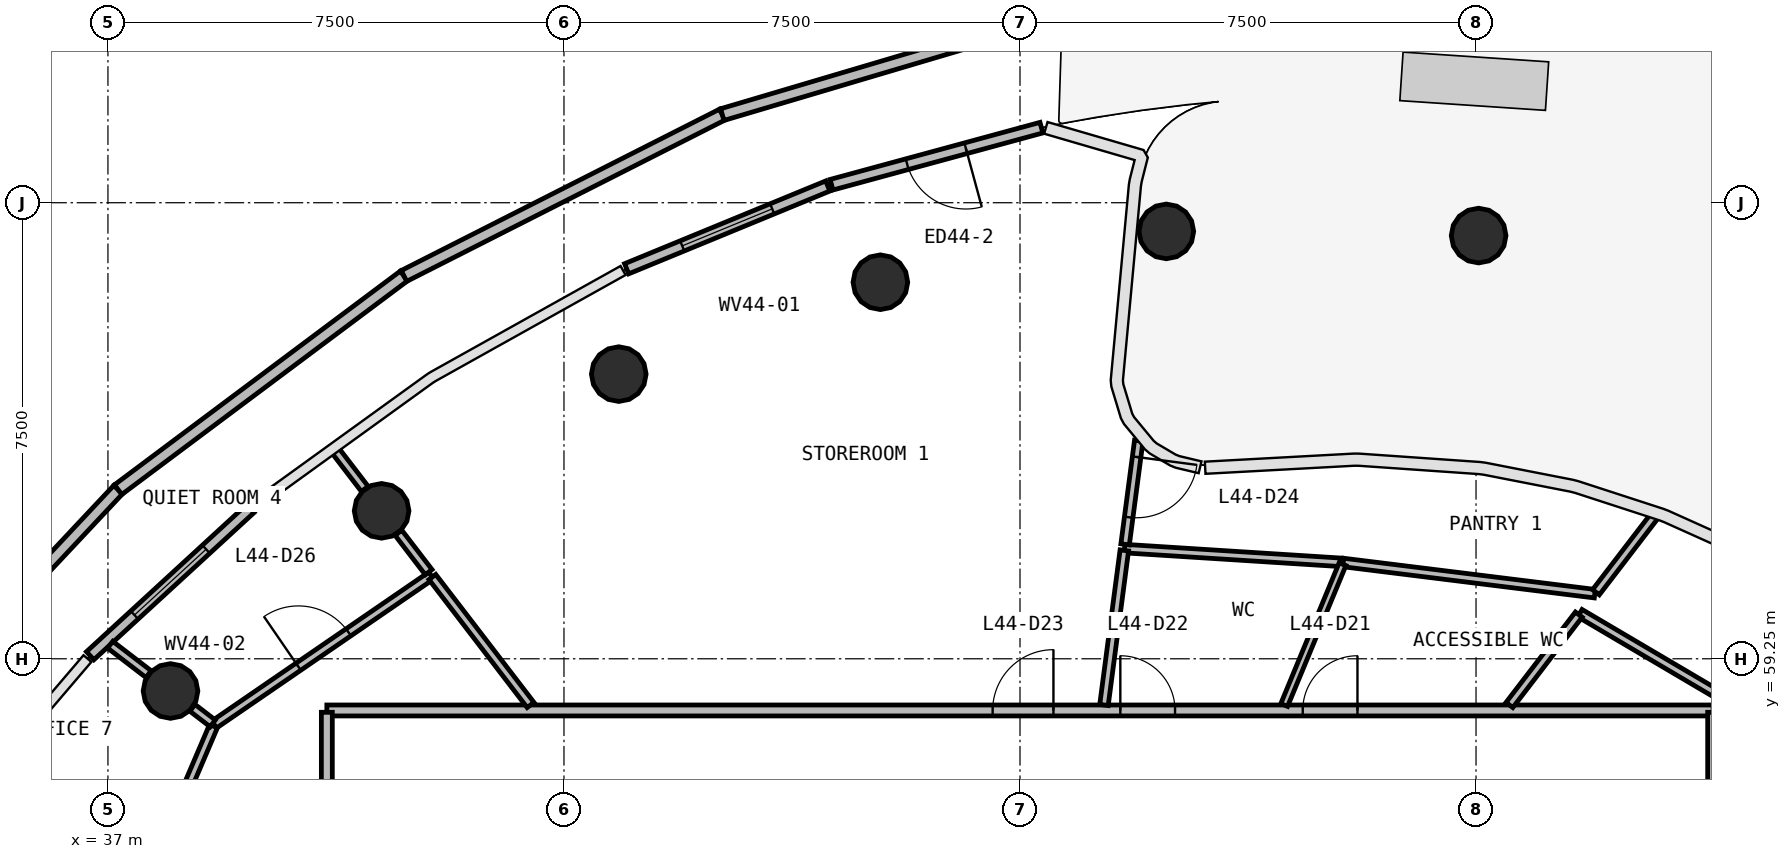
"""IFC4 building model, lengths in metres.
Left out: names, types, materials, properties, quantities, classifications, styles, units other than length and angle.
Written with IfcOpenShell. Run it as: python <this file> out.ifc"""

import sys

from ifc_helpers import new_model, si_unit, direction, frame, frame_2d, origin, origin_2d, place, context, subcontext, project, spatial, rectangle, circle, extrude, source, transform, mapped, element, fill, save


model = new_model("IFC4")
c1 = context("Model", 3, precision=1e-05, world=origin(), true_north=direction((0.0, 1.0)))
c2 = subcontext(c1, "Body", "Model", "MODEL_VIEW")
j1 = project(units=[si_unit("LENGTHUNIT", "METRE"), si_unit("PLANEANGLEUNIT", "RADIAN")], contexts=[c1])
p1 = place(None, origin())
s1 = spatial("IfcSite", under=j1, at=p1, CompositionType="ELEMENT")
p2 = place(p1, origin())
s2 = spatial("IfcBuilding", under=s1, at=p2, CompositionType="ELEMENT")
p3 = place(p2, frame((0.0, 0.0, 183.8)))
s3 = spatial("IfcBuildingStorey", under=s2, at=p3, CompositionType="ELEMENT", Elevation=183.8)
m1 = source(origin(), c2, "Body", "SweptSolid", [
    extrude(circle(Radius=0.45, at=origin_2d()), origin(), (0.0, 0.0, 1.0), 4.22),
])
for number, where, z_axis, x_axis in (
    (1, (59.543, 66.21, -0.32), (0.0, 0.0, 1.0), (1.0, 0.0, 0.0)),
    (2, (54.406, 66.278, -0.32), (0.0, 0.0, 1.0), (1.0, 0.0, 0.0)),
    (3, (49.704, 65.442, -0.32), (0.0, 0.0, 1.0), (1.0, 0.0, 0.0)),
    (4, (45.401, 63.931, -0.32), (0.0, 0.0, 1.0), (1.0, 0.0, 0.0)),
    (5, (41.501, 61.683, -0.32), (0.0, 0.0, 1.0), (1.0, 0.0, 0.0)),
    (6, (38.029, 58.72, -0.32), (0.0, 0.0, 1.0), (1.0, 0.0, 0.0)),
):
    element("IfcColumn", number, at=place(p3, frame(where, z_axis=z_axis, x_axis=x_axis)), inside=s3, PredefinedType="COLUMN", context=c2, shape_type="MappedRepresentation", body=[
        mapped(m1, transform((0.0, 0.0, 0.0), scale=1.0)),
    ])
p4 = place(p3, frame((52.352, 67.985, 0.0), z_axis=(0.0, 0.0, 1.0), x_axis=(-0.964955707813, -0.262412808299, 0.0)))
e7 = element("IfcWall", 7, at=p4, inside=s3, PredefinedType="STANDARD", context=c2, shape_type="SweptSolid", body=[
    extrude(rectangle(XDim=3.577, YDim=0.18, at=frame_2d((1.789, 0.0))), origin(), (0.0, 0.0, 1.0), 3.58),
])
p5 = place(p4, frame((1.289, 0.0, 0.0)))
e8 = element("IfcOpeningElement", 8, at=p5, cuts=e7, PredefinedType="OPENING", context=c2, shape_type="SweptSolid", body=[
    extrude(rectangle(XDim=1.0, YDim=2.1, at=frame_2d((0.5, 1.05))), frame((0.0, 0.1, 0.0), z_axis=(0.0, -1.0, 0.0), x_axis=(1.0, 0.0, 0.0)), (0.0, 0.0, 1.0), 0.2),
])
p6 = place(p3, frame((48.839, 67.025, 0.0), z_axis=(0.0, 0.0, 1.0), x_axis=(-0.924793951739, -0.380468325655, 0.0)))
e9 = element("IfcWall", 9, at=p6, inside=s3, PredefinedType="STANDARD", context=c2, shape_type="SweptSolid", body=[
    extrude(rectangle(XDim=3.577, YDim=0.18, at=frame_2d((1.789, 0.0))), origin(), (0.0, 0.0, 1.0), 3.58),
])
p7 = place(p6, frame((0.989, 0.0, 0.9)))
e10 = element("IfcOpeningElement", 10, at=p7, cuts=e9, PredefinedType="OPENING", context=c2, shape_type="SweptSolid", body=[
    extrude(rectangle(XDim=1.6, YDim=2.0, at=frame_2d((0.8, 1.0))), frame((0.0, 0.1, 0.0), z_axis=(0.0, -1.0, 0.0), x_axis=(1.0, 0.0, 0.0)), (0.0, 0.0, 1.0), 0.2),
])
p8 = place(p3, frame((39.343, 61.72, 0.0), z_axis=(0.0, 0.0, 1.0), x_axis=(-0.736559026804, -0.67637326975, 0.0)))
e11 = element("IfcWall", 11, at=p8, inside=s3, PredefinedType="STANDARD", context=c2, shape_type="SweptSolid", body=[
    extrude(rectangle(XDim=3.578, YDim=0.18, at=frame_2d((1.789, 0.0))), origin(), (0.0, 0.0, 1.0), 3.58),
])
p9 = place(p8, frame((0.989, 0.0, 0.9)))
e12 = element("IfcOpeningElement", 12, at=p9, cuts=e11, PredefinedType="OPENING", context=c2, shape_type="SweptSolid", body=[
    extrude(rectangle(XDim=1.6, YDim=2.0, at=frame_2d((0.8, 1.0))), frame((0.0, 0.1, 0.0), z_axis=(0.0, -1.0, 0.0), x_axis=(1.0, 0.0, 0.0)), (0.0, 0.0, 1.0), 0.2),
])
p10 = place(p3, frame((33.151, 57.753, 0.0), z_axis=(0.0, 0.0, 1.0), x_axis=(0.684414246662, 0.729093367797, 0.0)))
e13 = element("IfcWall", 13, at=p10, inside=s3, PredefinedType="PARAPET", context=c2, shape_type="SweptSolid", body=[
    extrude(rectangle(XDim=5.869, YDim=0.2, at=frame_2d((2.934, 0.0))), origin(), (0.0, 0.0, 1.0), 1.1),
])
p11 = place(p3, frame((37.168, 62.031, 0.0), z_axis=(0.0, 0.0, 1.0), x_axis=(0.80092247394, 0.598768060886, 0.0)))
e14 = element("IfcWall", 14, at=p11, inside=s3, PredefinedType="PARAPET", context=c2, shape_type="SweptSolid", body=[
    extrude(rectangle(XDim=5.869, YDim=0.2, at=frame_2d((2.935, 0.0))), origin(), (0.0, 0.0, 1.0), 1.1),
])
p12 = place(p3, frame((41.869, 65.546, 0.0), z_axis=(0.0, 0.0, 1.0), x_axis=(0.89196778564, 0.452098959721, 0.0)))
e15 = element("IfcWall", 15, at=p12, inside=s3, PredefinedType="PARAPET", context=c2, shape_type="SweptSolid", body=[
    extrude(rectangle(XDim=5.869, YDim=0.2, at=frame_2d((2.935, 0.0))), origin(), (0.0, 0.0, 1.0), 1.1),
])
p13 = place(p3, frame((47.104, 68.199, 0.0), z_axis=(0.0, 0.0, 1.0), x_axis=(0.958796433712, 0.284093996241, 0.0)))
e16 = element("IfcWall", 16, at=p13, inside=s3, PredefinedType="PARAPET", context=c2, shape_type="SweptSolid", body=[
    extrude(rectangle(XDim=5.868, YDim=0.2, at=frame_2d((2.934, 0.0))), origin(), (0.0, 0.0, 1.0), 1.1),
])
p14 = place(p3, frame((40.6, 58.4, 0.0), z_axis=(0.0, 0.0, 1.0), x_axis=(1.0, 0.0, 0.0)))
e17 = element("IfcWall", 17, at=p14, inside=s3, PredefinedType="PARTITIONING", context=c2, shape_type="SweptSolid", body=[
    extrude(rectangle(XDim=22.8, YDim=0.18, at=frame_2d((11.4, 0.0))), origin(), (0.0, 0.0, 1.0), 2.88),
])
p15 = place(p14, frame((16.05, 0.0, 0.0)))
e18 = element("IfcOpeningElement", 18, at=p15, cuts=e17, PredefinedType="OPENING", context=c2, shape_type="SweptSolid", body=[
    extrude(rectangle(XDim=0.9, YDim=2.1, at=frame_2d((0.45, 1.05))), frame((0.0, 0.1, 0.0), z_axis=(0.0, -1.0, 0.0), x_axis=(1.0, 0.0, 0.0)), (0.0, 0.0, 1.0), 0.2),
])
p16 = place(p14, frame((13.05, 0.0, 0.0)))
e19 = element("IfcOpeningElement", 19, at=p16, cuts=e17, PredefinedType="OPENING", context=c2, shape_type="SweptSolid", body=[
    extrude(rectangle(XDim=0.9, YDim=2.1, at=frame_2d((0.45, 1.05))), frame((0.0, 0.1, 0.0), z_axis=(0.0, -1.0, 0.0), x_axis=(1.0, 0.0, 0.0)), (0.0, 0.0, 1.0), 0.2),
])
p17 = place(p14, frame((10.95, 0.0, 0.0)))
e20 = element("IfcOpeningElement", 20, at=p17, cuts=e17, PredefinedType="OPENING", context=c2, shape_type="SweptSolid", body=[
    extrude(rectangle(XDim=1.0, YDim=2.1, at=frame_2d((0.5, 1.05))), frame((0.0, 0.1, 0.0), z_axis=(0.0, -1.0, 0.0), x_axis=(1.0, 0.0, 0.0)), (0.0, 0.0, 1.0), 0.2),
])
p18 = place(p3, frame((63.4, 58.37, 0.0), z_axis=(0.0, 0.0, 1.0), x_axis=(0.0, -1.0, 0.0)))
e21 = element("IfcWall", 21, at=p18, inside=s3, PredefinedType="PARTITIONING", context=c2, shape_type="SweptSolid", body=[
    extrude(rectangle(XDim=20.74, YDim=0.18, at=frame_2d((10.37, 0.0))), origin(), (0.0, 0.0, 1.0), 2.88),
])
p19 = place(p18, frame((7.69, 0.0, 0.0)))
e22 = element("IfcOpeningElement", 22, at=p19, cuts=e21, PredefinedType="OPENING", context=c2, shape_type="SweptSolid", body=[
    extrude(rectangle(XDim=1.0, YDim=2.1, at=frame_2d((0.5, 1.05))), frame((0.0, 0.1, 0.0), z_axis=(0.0, -1.0, 0.0), x_axis=(1.0, 0.0, 0.0)), (0.0, 0.0, 1.0), 0.2),
])
p20 = place(p18, frame((9.89, 0.0, 0.0)))
e23 = element("IfcOpeningElement", 23, at=p20, cuts=e21, PredefinedType="OPENING", context=c2, shape_type="SweptSolid", body=[
    extrude(rectangle(XDim=1.0, YDim=2.1, at=frame_2d((0.5, 1.05))), frame((0.0, 0.1, 0.0), z_axis=(0.0, -1.0, 0.0), x_axis=(1.0, 0.0, 0.0)), (0.0, 0.0, 1.0), 0.2),
])
p21 = place(p3, frame((40.6, 37.63, 0.0), z_axis=(0.0, 0.0, 1.0), x_axis=(0.0, 1.0, 0.0)))
e24 = element("IfcWall", 24, at=p21, inside=s3, PredefinedType="PARTITIONING", context=c2, shape_type="SweptSolid", body=[
    extrude(rectangle(XDim=20.74, YDim=0.18, at=frame_2d((10.37, 0.0))), origin(), (0.0, 0.0, 1.0), 2.88),
])
p22 = place(p21, frame((12.09, 0.0, 0.0)))
e25 = element("IfcOpeningElement", 25, at=p22, cuts=e24, PredefinedType="OPENING", context=c2, shape_type="SweptSolid", body=[
    extrude(rectangle(XDim=1.0, YDim=2.1, at=frame_2d((0.5, 1.05))), frame((0.0, 0.1, 0.0), z_axis=(0.0, -1.0, 0.0), x_axis=(1.0, 0.0, 0.0)), (0.0, 0.0, 1.0), 0.2),
])
p23 = place(p21, frame((9.89, 0.0, 0.0)))
e26 = element("IfcOpeningElement", 26, at=p23, cuts=e24, PredefinedType="OPENING", context=c2, shape_type="SweptSolid", body=[
    extrude(rectangle(XDim=1.0, YDim=2.1, at=frame_2d((0.5, 1.05))), frame((0.0, 0.1, 0.0), z_axis=(0.0, -1.0, 0.0), x_axis=(1.0, 0.0, 0.0)), (0.0, 0.0, 1.0), 0.2),
])
p24 = place(p3, frame((38.747, 58.169, 0.0), z_axis=(0.0, 0.0, 1.0), x_axis=(0.824531922814, 0.565815436569, 0.0)))
e27 = element("IfcWall", 27, at=p24, inside=s3, PredefinedType="PARTITIONING", context=c2, shape_type="SweptSolid", body=[
    extrude(rectangle(XDim=4.33, YDim=0.14, at=frame_2d((2.165, 0.0))), origin(), (0.0, 0.0, 1.0), 2.88),
])
p25 = place(p24, frame((1.68, 0.0, 0.0)))
e28 = element("IfcOpeningElement", 28, at=p25, cuts=e27, PredefinedType="OPENING", context=c2, shape_type="SweptSolid", body=[
    extrude(rectangle(XDim=1.0, YDim=2.1, at=frame_2d((0.5, 1.05))), frame((0.0, 0.08, 0.0), z_axis=(0.0, -1.0, 0.0), x_axis=(1.0, 0.0, 0.0)), (0.0, 0.0, 1.0), 0.16),
])
p26 = place(p3, frame((37.047, 54.194, 0.0), z_axis=(0.0, 0.0, 1.0), x_axis=(0.393178046525, 0.919462355799, 0.0)))
e29 = element("IfcWall", 29, at=p26, inside=s3, PredefinedType="PARTITIONING", context=c2, shape_type="SweptSolid", body=[
    extrude(rectangle(XDim=4.294, YDim=0.14, at=frame_2d((2.147, 0.0))), origin(), (0.0, 0.0, 1.0), 2.88),
])
p27 = place(p26, frame((1.644, 0.0, 0.0)))
e30 = element("IfcOpeningElement", 30, at=p27, cuts=e29, PredefinedType="OPENING", context=c2, shape_type="SweptSolid", body=[
    extrude(rectangle(XDim=1.0, YDim=2.1, at=frame_2d((0.5, 1.05))), frame((0.0, 0.08, 0.0), z_axis=(0.0, -1.0, 0.0), x_axis=(1.0, 0.0, 0.0)), (0.0, 0.0, 1.0), 0.16),
])
p28 = place(p3, frame((64.82, 57.872, 0.0), z_axis=(0.0, 0.0, 1.0), x_axis=(-0.861535732384, 0.507696938957, 0.0)))
e31 = element("IfcWall", 31, at=p28, inside=s3, PredefinedType="PARTITIONING", context=c2, shape_type="SweptSolid", body=[
    extrude(rectangle(XDim=4.192, YDim=0.14, at=frame_2d((2.096, 0.0))), origin(), (0.0, 0.0, 1.0), 2.88),
])
p29 = place(p3, frame((61.454, 60.321, 0.0), z_axis=(0.0, 0.0, 1.0), x_axis=(-0.99239722015, 0.123076226135, 0.0)))
e32 = element("IfcWall", 32, at=p29, inside=s3, PredefinedType="PARTITIONING", context=c2, shape_type="SweptSolid", body=[
    extrude(rectangle(XDim=4.17, YDim=0.14, at=frame_2d((2.085, 0.0))), origin(), (0.0, 0.0, 1.0), 2.88),
])
p30 = place(p3, frame((41.777, 61.323, 0.0), z_axis=(0.0, 0.0, 1.0), x_axis=(0.608670009796, -0.793423480353, 0.0)))
e33 = element("IfcWall", 33, at=p30, inside=s3, PredefinedType="PARTITIONING", context=c2, shape_type="SweptSolid", body=[
    extrude(rectangle(XDim=0.817, YDim=0.14, at=frame_2d((0.408, 0.0))), origin(), (0.0, 0.0, 1.0), 2.88),
])
p31 = place(p3, frame((42.335, 60.595, 0.0), z_axis=(0.0, 0.0, 1.0), x_axis=(0.608723171591, -0.793382694775, 0.0)))
e34 = element("IfcWall", 34, at=p31, inside=s3, PredefinedType="PARTITIONING", context=c2, shape_type="SweptSolid", body=[
    extrude(rectangle(XDim=2.654, YDim=0.14, at=frame_2d((1.327, 0.0))), origin(), (0.0, 0.0, 1.0), 2.88),
])
p32 = place(p3, frame((57.286, 60.836, 0.0), z_axis=(0.0, 0.0, 1.0), x_axis=(-0.997992577904, 0.063330991218, 0.0)))
e35 = element("IfcWall", 35, at=p32, inside=s3, PredefinedType="PARTITIONING", context=c2, shape_type="SweptSolid", body=[
    extrude(rectangle(XDim=3.573, YDim=0.14, at=frame_2d((1.787, 0.0))), origin(), (0.0, 0.0, 1.0), 2.88),
])
p33 = place(p3, frame((53.381, 58.49, 0.0), z_axis=(0.0, 0.0, 1.0), x_axis=(0.130535789174, 0.991443597864, 0.0)))
e36 = element("IfcWall", 36, at=p33, inside=s3, PredefinedType="PARTITIONING", context=c2, shape_type="SweptSolid", body=[
    extrude(rectangle(XDim=2.564, YDim=0.14, at=frame_2d((1.282, 0.0))), origin(), (0.0, 0.0, 1.0), 2.88),
])
p34 = place(p3, frame((60.049, 58.49, 0.0), z_axis=(0.0, 0.0, 1.0), x_axis=(0.60874059601, 0.793369325579, 0.0)))
e37 = element("IfcWall", 37, at=p34, inside=s3, PredefinedType="PARTITIONING", context=c2, shape_type="SweptSolid", body=[
    extrude(rectangle(XDim=1.874, YDim=0.14, at=frame_2d((0.937, 0.0))), origin(), (0.0, 0.0, 1.0), 2.88),
])
p35 = place(p3, frame((53.953, 62.836, 0.0), z_axis=(0.0, 0.0, 1.0), x_axis=(-0.130619781296, -0.991432535644, 0.0)))
e38 = element("IfcWall", 38, at=p35, inside=s3, PredefinedType="PARTITIONING", context=c2, shape_type="SweptSolid", body=[
    extrude(rectangle(XDim=1.719, YDim=0.14, at=frame_2d((0.86, 0.0))), origin(), (0.0, 0.0, 1.0), 2.88),
])
p36 = place(p35, frame((0.27, 0.0, 0.0)))
e39 = element("IfcOpeningElement", 39, at=p36, cuts=e38, PredefinedType="OPENING", context=c2, shape_type="SweptSolid", body=[
    extrude(rectangle(XDim=1.0, YDim=2.1, at=frame_2d((0.5, 1.05))), frame((0.0, 0.08, 0.0), z_axis=(0.0, -1.0, 0.0), x_axis=(1.0, 0.0, 0.0)), (0.0, 0.0, 1.0), 0.16),
])
p37 = place(p3, frame((61.472, 60.344, 0.0), z_axis=(0.0, 0.0, 1.0), x_axis=(0.608719514622, 0.793385500572, 0.0)))
e40 = element("IfcWall", 40, at=p37, inside=s3, PredefinedType="PARTITIONING", context=c2, shape_type="SweptSolid", body=[
    extrude(rectangle(XDim=1.584, YDim=0.14, at=frame_2d((0.792, 0.0))), origin(), (0.0, 0.0, 1.0), 2.88),
])
p38 = place(p3, frame((37.668, 58.997, 0.0), z_axis=(0.0, 0.0, 1.0), x_axis=(-0.793364436395, 0.608746968011, 0.0)))
e41 = element("IfcWall", 41, at=p38, inside=s3, PredefinedType="PARTITIONING", context=c2, shape_type="SweptSolid", body=[
    extrude(rectangle(XDim=0.796, YDim=0.14, at=frame_2d((0.398, 0.0))), origin(), (0.0, 0.0, 1.0), 2.88),
])
p39 = place(p3, frame((41.224, 62.044, 0.0), z_axis=(0.0, 0.0, 1.0), x_axis=(-0.608959740389, 0.793201131231, 0.0)))
e42 = element("IfcWall", 42, at=p39, inside=s3, PredefinedType="PARTITIONING", context=c2, shape_type="SweptSolid", body=[
    extrude(rectangle(XDim=0.786, YDim=0.14, at=frame_2d((0.393, 0.0))), origin(), (0.0, 0.0, 1.0), 2.88),
])
p40 = place(p3, frame((38.723, 58.188, 0.0), z_axis=(0.0, 0.0, 1.0), x_axis=(-0.793335399531, 0.60878480915, 0.0)))
e43 = element("IfcWall", 43, at=p40, inside=s3, PredefinedType="PARTITIONING", context=c2, shape_type="SweptSolid", body=[
    extrude(rectangle(XDim=0.421, YDim=0.14, at=frame_2d((0.21, 0.0))), origin(), (0.0, 0.0, 1.0), 2.88),
])
p41 = place(p3, frame((56.345, 58.49, 0.0), z_axis=(0.0, 0.0, 1.0), x_axis=(0.382664324241, 0.923887447124, 0.0)))
e44 = element("IfcWall", 44, at=p41, inside=s3, PredefinedType="PARTITIONING", context=c2, shape_type="SweptSolid", body=[
    extrude(rectangle(XDim=2.507, YDim=0.12, at=frame_2d((1.253, 0.0))), origin(), (0.0, 0.0, 1.0), 2.88),
])
m2 = source(origin(), c2, "Body", "SweptSolid", [
    extrude(rectangle(XDim=1.0, YDim=2.1, at=frame_2d((0.5, 1.05))), frame((0.0, 0.025, 0.0), z_axis=(0.0, -1.0, 0.0), x_axis=(1.0, 0.0, 0.0)), (0.0, 0.0, 1.0), 0.05),
])
p42 = place(p5, origin())
e45 = element("IfcDoor", 45, at=p42, inside=s3, OperationType="SINGLE_SWING_LEFT", PredefinedType="DOOR", context=c2, shape_type="MappedRepresentation", body=[
    mapped(m2, transform((0.0, 0.0, 0.0), scale=1.0)),
])
fill(e8, e45)
m3 = source(origin(), c2, "Body", "SweptSolid", [
    extrude(rectangle(XDim=1.6, YDim=2.0, at=frame_2d((0.8, 1.0))), frame((0.0, 0.03, 0.0), z_axis=(0.0, -1.0, 0.0), x_axis=(1.0, 0.0, 0.0)), (0.0, 0.0, 1.0), 0.06),
])
p43 = place(p7, origin())
e46 = element("IfcWindow", 46, at=p43, inside=s3, PartitioningType="SINGLE_PANEL", PredefinedType="WINDOW", context=c2, shape_type="MappedRepresentation", body=[
    mapped(m3, transform((0.0, 0.0, 0.0), scale=1.0)),
])
fill(e10, e46)
p44 = place(p9, origin())
e47 = element("IfcWindow", 47, at=p44, inside=s3, PartitioningType="SINGLE_PANEL", PredefinedType="WINDOW", context=c2, shape_type="MappedRepresentation", body=[
    mapped(m3, transform((0.0, 0.0, 0.0), scale=1.0)),
])
fill(e12, e47)
m4 = source(origin(), c2, "Body", "SweptSolid", [
    extrude(rectangle(XDim=0.9, YDim=2.1, at=frame_2d((0.45, 1.05))), frame((0.0, 0.025, 0.0), z_axis=(0.0, -1.0, 0.0), x_axis=(1.0, 0.0, 0.0)), (0.0, 0.0, 1.0), 0.05),
])
p45 = place(p15, origin())
e48 = element("IfcDoor", 48, at=p45, inside=s3, OperationType="SINGLE_SWING_RIGHT", PredefinedType="DOOR", context=c2, shape_type="MappedRepresentation", body=[
    mapped(m4, transform((0.0, 0.0, 0.0), scale=1.0)),
])
fill(e18, e48)
p46 = place(p16, origin())
e49 = element("IfcDoor", 49, at=p46, inside=s3, OperationType="SINGLE_SWING_LEFT", PredefinedType="DOOR", context=c2, shape_type="MappedRepresentation", body=[
    mapped(m4, transform((0.0, 0.0, 0.0), scale=1.0)),
])
fill(e19, e49)
m5 = source(origin(), c2, "Body", "SweptSolid", [
    extrude(rectangle(XDim=1.0, YDim=2.1, at=frame_2d((0.5, 1.05))), frame((0.0, 0.025, 0.0), z_axis=(0.0, -1.0, 0.0), x_axis=(1.0, 0.0, 0.0)), (0.0, 0.0, 1.0), 0.05),
])
p47 = place(p17, origin())
e50 = element("IfcDoor", 50, at=p47, inside=s3, OperationType="SINGLE_SWING_RIGHT", PredefinedType="DOOR", context=c2, shape_type="MappedRepresentation", body=[
    mapped(m5, transform((0.0, 0.0, 0.0), scale=1.0)),
])
fill(e20, e50)
p48 = place(p36, origin())
e51 = element("IfcDoor", 51, at=p48, inside=s3, OperationType="SINGLE_SWING_LEFT", PredefinedType="DOOR", context=c2, shape_type="MappedRepresentation", body=[
    mapped(m5, transform((0.0, 0.0, 0.0), scale=1.0)),
])
fill(e39, e51)
p49 = place(p25, origin())
e52 = element("IfcDoor", 52, at=p49, inside=s3, OperationType="SINGLE_SWING_LEFT", PredefinedType="DOOR", context=c2, shape_type="MappedRepresentation", body=[
    mapped(m5, transform((0.0, 0.0, 0.0), scale=1.0)),
])
fill(e28, e52)
save(model, sys.argv[1])
